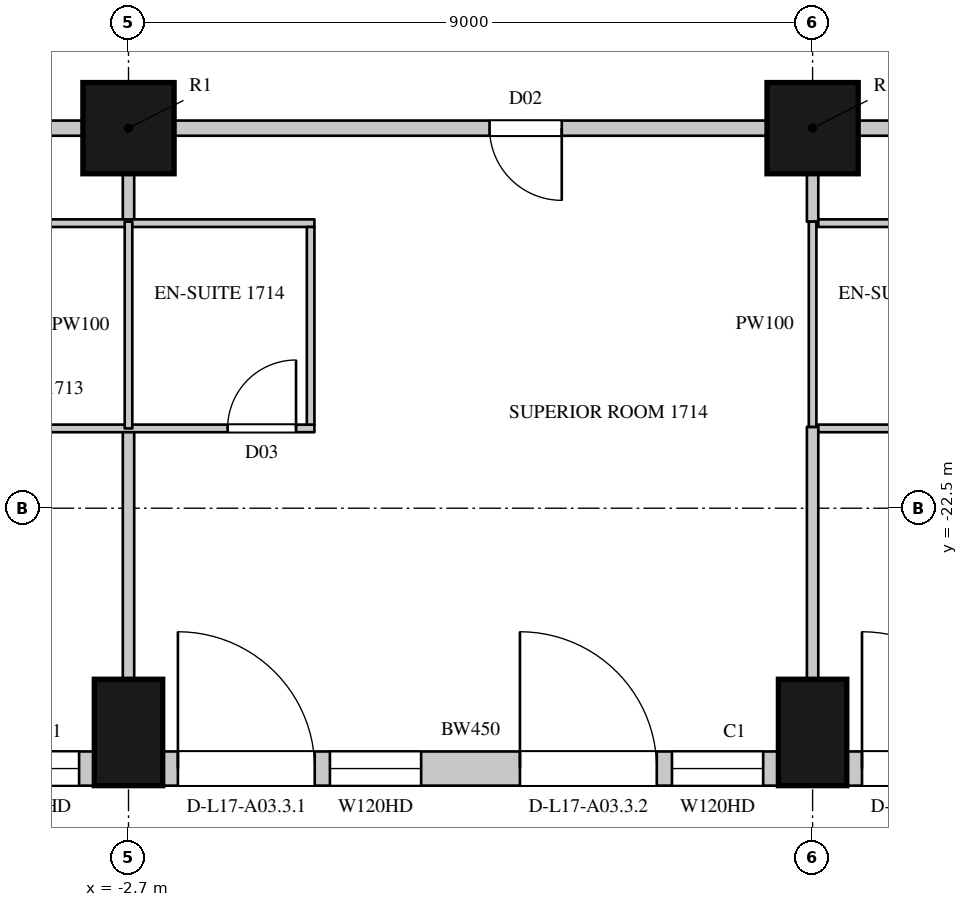
"""IFC4 building model, lengths in metres.
Left out: names, types, materials, properties, quantities, classifications, styles, units other than length and angle.
Written with IfcOpenShell. Run it as: python <this file> out.ifc"""

import sys

from ifc_helpers import new_model, si_unit, direction, frame, frame_2d, origin, origin_2d, place, context, subcontext, project, spatial, rectangle, circle, extrude, element, fill, save


model = new_model("IFC4")
c1 = context("Model", 3, precision=1e-05, world=origin(), true_north=direction((0.0, 1.0)))
c2 = subcontext(c1, "Body", "Model", "MODEL_VIEW")
j1 = project(units=[si_unit("LENGTHUNIT", "METRE"), si_unit("PLANEANGLEUNIT", "RADIAN")], contexts=[c1])
p1 = place(None, origin())
s1 = spatial("IfcSite", under=j1, at=p1, CompositionType="ELEMENT")
p2 = place(p1, origin())
s2 = spatial("IfcBuilding", under=s1, at=p2, CompositionType="ELEMENT")
p3 = place(p2, frame((0.0, 0.0, 91.5)))
s3 = spatial("IfcBuildingStorey", under=s2, at=p3, CompositionType="ELEMENT", Elevation=91.5)
for number, where, z_axis, x_axis in (
    (1, (-2.7, -25.45, 0.0), (0.0, 0.0, 1.0), (1.0, 0.0, 0.0)),
    (2, (6.3, -25.45, 0.0), (0.0, 0.0, 1.0), (1.0, 0.0, 0.0)),
):
    element("IfcColumn", number, at=place(p3, frame(where, z_axis=z_axis, x_axis=x_axis)), inside=s3, PredefinedType="COLUMN", context=c2, shape_type="SweptSolid", body=[
        extrude(rectangle(XDim=0.9, YDim=1.4, at=origin_2d()), origin(), (0.0, 0.0, 1.0), 3.6),
    ])
for number, where, z_axis, x_axis in (
    (3, (-2.7, -17.5, 0.0), (0.0, 0.0, 1.0), (1.0, 0.0, 0.0)),
    (4, (6.3, -17.5, 0.0), (0.0, 0.0, 1.0), (1.0, 0.0, 0.0)),
):
    element("IfcColumn", number, at=place(p3, frame(where, z_axis=z_axis, x_axis=x_axis)), inside=s3, PredefinedType="COLUMN", context=c2, shape_type="SweptSolid", body=[
        extrude(circle(Radius=0.6, at=origin_2d()), origin(), (0.0, 0.0, 1.0), 3.6),
    ])
p4 = place(p3, frame((-11.25, -25.925, 0.0), z_axis=(0.0, 0.0, 1.0), x_axis=(1.0, 0.0, 0.0)))
e5 = element("IfcWall", 5, at=p4, inside=s3, PredefinedType="SOLIDWALL", context=c2, shape_type="SweptSolid", body=[
    extrude(rectangle(XDim=8.1, YDim=0.45, at=frame_2d((4.05, 0.0))), origin(), (0.0, 0.0, 1.0), 3.3),
])
p5 = place(p4, frame((0.2, 0.0, 0.0)))
e6 = element("IfcOpeningElement", 6, at=p5, cuts=e5, PredefinedType="OPENING", context=c2, shape_type="SweptSolid", body=[
    extrude(rectangle(XDim=1.8, YDim=2.4, at=frame_2d((0.9, 1.2))), frame((0.0, 0.235, 0.0), z_axis=(0.0, -1.0, 0.0), x_axis=(1.0, 0.0, 0.0)), (0.0, 0.0, 1.0), 0.47),
])
p6 = place(p4, frame((2.2, 0.0, 1.05)))
e7 = element("IfcOpeningElement", 7, at=p6, cuts=e5, PredefinedType="OPENING", context=c2, shape_type="SweptSolid", body=[
    extrude(rectangle(XDim=1.2, YDim=2.0, at=frame_2d((0.6, 1.0))), frame((0.0, 0.235, 0.0), z_axis=(0.0, -1.0, 0.0), x_axis=(1.0, 0.0, 0.0)), (0.0, 0.0, 1.0), 0.47),
])
p7 = place(p4, frame((4.7, 0.0, 0.0)))
e8 = element("IfcOpeningElement", 8, at=p7, cuts=e5, PredefinedType="OPENING", context=c2, shape_type="SweptSolid", body=[
    extrude(rectangle(XDim=1.8, YDim=2.4, at=frame_2d((0.9, 1.2))), frame((0.0, 0.235, 0.0), z_axis=(0.0, -1.0, 0.0), x_axis=(1.0, 0.0, 0.0)), (0.0, 0.0, 1.0), 0.47),
])
p8 = place(p4, frame((6.7, 0.0, 1.05)))
e9 = element("IfcOpeningElement", 9, at=p8, cuts=e5, PredefinedType="OPENING", context=c2, shape_type="SweptSolid", body=[
    extrude(rectangle(XDim=1.2, YDim=2.0, at=frame_2d((0.6, 1.0))), frame((0.0, 0.235, 0.0), z_axis=(0.0, -1.0, 0.0), x_axis=(1.0, 0.0, 0.0)), (0.0, 0.0, 1.0), 0.47),
])
p9 = place(p3, frame((-2.25, -25.925, 0.0), z_axis=(0.0, 0.0, 1.0), x_axis=(1.0, 0.0, 0.0)))
e10 = element("IfcWall", 10, at=p9, inside=s3, PredefinedType="SOLIDWALL", context=c2, shape_type="SweptSolid", body=[
    extrude(rectangle(XDim=8.1, YDim=0.45, at=frame_2d((4.05, 0.0))), origin(), (0.0, 0.0, 1.0), 3.3),
])
p10 = place(p9, frame((0.2, 0.0, 0.0)))
e11 = element("IfcOpeningElement", 11, at=p10, cuts=e10, PredefinedType="OPENING", context=c2, shape_type="SweptSolid", body=[
    extrude(rectangle(XDim=1.8, YDim=2.4, at=frame_2d((0.9, 1.2))), frame((0.0, 0.235, 0.0), z_axis=(0.0, -1.0, 0.0), x_axis=(1.0, 0.0, 0.0)), (0.0, 0.0, 1.0), 0.47),
])
p11 = place(p9, frame((2.2, 0.0, 1.05)))
e12 = element("IfcOpeningElement", 12, at=p11, cuts=e10, PredefinedType="OPENING", context=c2, shape_type="SweptSolid", body=[
    extrude(rectangle(XDim=1.2, YDim=2.0, at=frame_2d((0.6, 1.0))), frame((0.0, 0.235, 0.0), z_axis=(0.0, -1.0, 0.0), x_axis=(1.0, 0.0, 0.0)), (0.0, 0.0, 1.0), 0.47),
])
p12 = place(p9, frame((4.7, 0.0, 0.0)))
e13 = element("IfcOpeningElement", 13, at=p12, cuts=e10, PredefinedType="OPENING", context=c2, shape_type="SweptSolid", body=[
    extrude(rectangle(XDim=1.8, YDim=2.4, at=frame_2d((0.9, 1.2))), frame((0.0, 0.235, 0.0), z_axis=(0.0, -1.0, 0.0), x_axis=(1.0, 0.0, 0.0)), (0.0, 0.0, 1.0), 0.47),
])
p13 = place(p9, frame((6.7, 0.0, 1.05)))
e14 = element("IfcOpeningElement", 14, at=p13, cuts=e10, PredefinedType="OPENING", context=c2, shape_type="SweptSolid", body=[
    extrude(rectangle(XDim=1.2, YDim=2.0, at=frame_2d((0.6, 1.0))), frame((0.0, 0.235, 0.0), z_axis=(0.0, -1.0, 0.0), x_axis=(1.0, 0.0, 0.0)), (0.0, 0.0, 1.0), 0.47),
])
p14 = place(p3, frame((6.75, -25.925, 0.0), z_axis=(0.0, 0.0, 1.0), x_axis=(1.0, 0.0, 0.0)))
e15 = element("IfcWall", 15, at=p14, inside=s3, PredefinedType="SOLIDWALL", context=c2, shape_type="SweptSolid", body=[
    extrude(rectangle(XDim=8.1, YDim=0.45, at=frame_2d((4.05, 0.0))), origin(), (0.0, 0.0, 1.0), 3.3),
])
p15 = place(p14, frame((0.2, 0.0, 0.0)))
e16 = element("IfcOpeningElement", 16, at=p15, cuts=e15, PredefinedType="OPENING", context=c2, shape_type="SweptSolid", body=[
    extrude(rectangle(XDim=1.8, YDim=2.4, at=frame_2d((0.9, 1.2))), frame((0.0, 0.235, 0.0), z_axis=(0.0, -1.0, 0.0), x_axis=(1.0, 0.0, 0.0)), (0.0, 0.0, 1.0), 0.47),
])
p16 = place(p14, frame((2.2, 0.0, 1.05)))
e17 = element("IfcOpeningElement", 17, at=p16, cuts=e15, PredefinedType="OPENING", context=c2, shape_type="SweptSolid", body=[
    extrude(rectangle(XDim=1.2, YDim=2.0, at=frame_2d((0.6, 1.0))), frame((0.0, 0.235, 0.0), z_axis=(0.0, -1.0, 0.0), x_axis=(1.0, 0.0, 0.0)), (0.0, 0.0, 1.0), 0.47),
])
p17 = place(p14, frame((5.4, 0.0, 0.0)))
e18 = element("IfcOpeningElement", 18, at=p17, cuts=e15, PredefinedType="OPENING", context=c2, shape_type="SweptSolid", body=[
    extrude(rectangle(XDim=1.8, YDim=2.4, at=frame_2d((0.9, 1.2))), frame((0.0, 0.235, 0.0), z_axis=(0.0, -1.0, 0.0), x_axis=(1.0, 0.0, 0.0)), (0.0, 0.0, 1.0), 0.47),
])
p18 = place(p3, frame((-11.1, -17.5, 0.0), z_axis=(0.0, 0.0, 1.0), x_axis=(1.0, 0.0, 0.0)))
e19 = element("IfcWall", 19, at=p18, inside=s3, PredefinedType="PARTITIONING", context=c2, shape_type="SweptSolid", body=[
    extrude(rectangle(XDim=7.8, YDim=0.2, at=frame_2d((3.9, 0.0))), origin(), (0.0, 0.0, 1.0), 2.75),
])
p19 = place(p18, frame((4.2, 0.0, 0.0)))
e20 = element("IfcOpeningElement", 20, at=p19, cuts=e19, PredefinedType="OPENING", context=c2, shape_type="SweptSolid", body=[
    extrude(rectangle(XDim=0.95, YDim=2.2, at=frame_2d((0.475, 1.1))), frame((0.0, 0.11, 0.0), z_axis=(0.0, -1.0, 0.0), x_axis=(1.0, 0.0, 0.0)), (0.0, 0.0, 1.0), 0.22),
])
p20 = place(p3, frame((-2.1, -17.5, 0.0), z_axis=(0.0, 0.0, 1.0), x_axis=(1.0, 0.0, 0.0)))
e21 = element("IfcWall", 21, at=p20, inside=s3, PredefinedType="PARTITIONING", context=c2, shape_type="SweptSolid", body=[
    extrude(rectangle(XDim=7.8, YDim=0.2, at=frame_2d((3.9, 0.0))), origin(), (0.0, 0.0, 1.0), 2.75),
])
p21 = place(p20, frame((4.15, 0.0, 0.0)))
e22 = element("IfcOpeningElement", 22, at=p21, cuts=e21, PredefinedType="OPENING", context=c2, shape_type="SweptSolid", body=[
    extrude(rectangle(XDim=0.95, YDim=2.2, at=frame_2d((0.475, 1.1))), frame((0.0, 0.11, 0.0), z_axis=(0.0, -1.0, 0.0), x_axis=(1.0, 0.0, 0.0)), (0.0, 0.0, 1.0), 0.22),
])
p22 = place(p3, frame((6.9, -17.5, 0.0), z_axis=(0.0, 0.0, 1.0), x_axis=(1.0, 0.0, 0.0)))
e23 = element("IfcWall", 23, at=p22, inside=s3, PredefinedType="PARTITIONING", context=c2, shape_type="SweptSolid", body=[
    extrude(rectangle(XDim=7.8, YDim=0.2, at=frame_2d((3.9, 0.0))), origin(), (0.0, 0.0, 1.0), 2.75),
])
p23 = place(p22, frame((2.4, 0.0, 0.0)))
e24 = element("IfcOpeningElement", 24, at=p23, cuts=e23, PredefinedType="OPENING", context=c2, shape_type="SweptSolid", body=[
    extrude(rectangle(XDim=0.95, YDim=2.2, at=frame_2d((0.475, 1.1))), frame((0.0, 0.11, 0.0), z_axis=(0.0, -1.0, 0.0), x_axis=(1.0, 0.0, 0.0)), (0.0, 0.0, 1.0), 0.22),
])
p24 = place(p22, frame((4.85, 0.0, 0.0)))
e25 = element("IfcOpeningElement", 25, at=p24, cuts=e23, PredefinedType="OPENING", context=c2, shape_type="SweptSolid", body=[
    extrude(rectangle(XDim=0.95, YDim=2.2, at=frame_2d((0.475, 1.1))), frame((0.0, 0.11, 0.0), z_axis=(0.0, -1.0, 0.0), x_axis=(1.0, 0.0, 0.0)), (0.0, 0.0, 1.0), 0.22),
])
p25 = place(p3, frame((-2.7, -24.75, 0.0), z_axis=(0.0, 0.0, 1.0), x_axis=(0.0, 1.0, 0.0)))
e26 = element("IfcWall", 26, at=p25, inside=s3, PredefinedType="PARTITIONING", context=c2, shape_type="SweptSolid", body=[
    extrude(rectangle(XDim=3.3, YDim=0.15, at=frame_2d((1.65, 0.0))), origin(), (0.0, 0.0, 1.0), 2.75),
])
p26 = place(p3, frame((-2.7, -18.73, 0.0), z_axis=(0.0, 0.0, 1.0), x_axis=(0.0, 1.0, 0.0)))
e27 = element("IfcWall", 27, at=p26, inside=s3, PredefinedType="PARTITIONING", context=c2, shape_type="SweptSolid", body=[
    extrude(rectangle(XDim=0.63, YDim=0.15, at=frame_2d((0.315, 0.0))), origin(), (0.0, 0.0, 1.0), 2.75),
])
p27 = place(p3, frame((6.3, -24.75, 0.0), z_axis=(0.0, 0.0, 1.0), x_axis=(0.0, 1.0, 0.0)))
e28 = element("IfcWall", 28, at=p27, inside=s3, PredefinedType="PARTITIONING", context=c2, shape_type="SweptSolid", body=[
    extrude(rectangle(XDim=3.32, YDim=0.15, at=frame_2d((1.66, 0.0))), origin(), (0.0, 0.0, 1.0), 2.75),
])
p28 = place(p3, frame((6.3, -18.73, 0.0), z_axis=(0.0, 0.0, 1.0), x_axis=(0.0, 1.0, 0.0)))
e29 = element("IfcWall", 29, at=p28, inside=s3, PredefinedType="PARTITIONING", context=c2, shape_type="SweptSolid", body=[
    extrude(rectangle(XDim=0.63, YDim=0.15, at=frame_2d((0.315, 0.0))), origin(), (0.0, 0.0, 1.0), 2.75),
])
p29 = place(p3, frame((-5.646, -21.45, 0.0), z_axis=(0.0, 0.0, 1.0), x_axis=(1.0, 0.0, 0.0)))
e30 = element("IfcWall", 30, at=p29, inside=s3, PredefinedType="PARTITIONING", context=c2, shape_type="SweptSolid", body=[
    extrude(rectangle(XDim=5.392, YDim=0.1, at=frame_2d((2.696, 0.0))), origin(), (0.0, 0.0, 1.0), 3.3),
])
p30 = place(p29, frame((4.25, 0.0, 0.0)))
e31 = element("IfcOpeningElement", 31, at=p30, cuts=e30, PredefinedType="OPENING", context=c2, shape_type="SweptSolid", body=[
    extrude(rectangle(XDim=0.9, YDim=2.2, at=frame_2d((0.45, 1.1))), frame((0.0, 0.06, 0.0), z_axis=(0.0, -1.0, 0.0), x_axis=(1.0, 0.0, 0.0)), (0.0, 0.0, 1.0), 0.12),
])
p31 = place(p3, frame((-5.646, -18.75, 0.0), z_axis=(0.0, 0.0, 1.0), x_axis=(1.0, 0.0, 0.0)))
e32 = element("IfcWall", 32, at=p31, inside=s3, PredefinedType="PARTITIONING", context=c2, shape_type="SweptSolid", body=[
    extrude(rectangle(XDim=5.392, YDim=0.1, at=frame_2d((2.696, 0.0))), origin(), (0.0, 0.0, 1.0), 3.3),
])
p32 = place(p3, frame((-2.7, -21.45, 0.0), z_axis=(0.0, 0.0, 1.0), x_axis=(0.0, 1.0, 0.0)))
e33 = element("IfcWall", 33, at=p32, inside=s3, PredefinedType="PARTITIONING", context=c2, shape_type="SweptSolid", body=[
    extrude(rectangle(XDim=2.72, YDim=0.1, at=frame_2d((1.36, 0.0))), origin(), (0.0, 0.0, 1.0), 2.75),
])
p33 = place(p3, frame((-0.304, -21.4, 0.0), z_axis=(0.0, 0.0, 1.0), x_axis=(0.0, 1.0, 0.0)))
e34 = element("IfcWall", 34, at=p33, inside=s3, PredefinedType="PARTITIONING", context=c2, shape_type="SweptSolid", body=[
    extrude(rectangle(XDim=2.6, YDim=0.1, at=frame_2d((1.3, 0.0))), origin(), (0.0, 0.0, 1.0), 3.3),
])
p34 = place(p3, frame((6.3, -21.43, 0.0), z_axis=(0.0, 0.0, 1.0), x_axis=(0.0, 1.0, 0.0)))
e35 = element("IfcWall", 35, at=p34, inside=s3, PredefinedType="PARTITIONING", context=c2, shape_type="SweptSolid", body=[
    extrude(rectangle(XDim=2.7, YDim=0.1, at=frame_2d((1.35, 0.0))), origin(), (0.0, 0.0, 1.0), 2.75),
])
p35 = place(p3, frame((6.375, -21.45, 0.0), z_axis=(0.0, 0.0, 1.0), x_axis=(1.0, 0.0, 0.0)))
e36 = element("IfcWall", 36, at=p35, inside=s3, PredefinedType="PARTITIONING", context=c2, shape_type="SweptSolid", body=[
    extrude(rectangle(XDim=2.371, YDim=0.1, at=frame_2d((1.186, 0.0))), origin(), (0.0, 0.0, 1.0), 3.3),
])
p36 = place(p35, frame((1.25, 0.0, 0.0)))
e37 = element("IfcOpeningElement", 37, at=p36, cuts=e36, PredefinedType="OPENING", context=c2, shape_type="SweptSolid", body=[
    extrude(rectangle(XDim=0.9, YDim=2.2, at=frame_2d((0.45, 1.1))), frame((0.0, 0.06, 0.0), z_axis=(0.0, -1.0, 0.0), x_axis=(1.0, 0.0, 0.0)), (0.0, 0.0, 1.0), 0.12),
])
p37 = place(p3, frame((6.375, -18.75, 0.0), z_axis=(0.0, 0.0, 1.0), x_axis=(1.0, 0.0, 0.0)))
e38 = element("IfcWall", 38, at=p37, inside=s3, PredefinedType="PARTITIONING", context=c2, shape_type="SweptSolid", body=[
    extrude(rectangle(XDim=2.371, YDim=0.1, at=frame_2d((1.186, 0.0))), origin(), (0.0, 0.0, 1.0), 3.3),
])
p38 = place(p8, origin())
e39 = element("IfcWindow", 39, at=p38, inside=s3, PartitioningType="SINGLE_PANEL", PredefinedType="WINDOW", context=c2, shape_type="SweptSolid", body=[
    extrude(rectangle(XDim=1.2, YDim=2.0, at=frame_2d((0.6, 1.0))), frame((0.0, 0.135, 0.0), z_axis=(0.0, -1.0, 0.0), x_axis=(1.0, 0.0, 0.0)), (0.0, 0.0, 1.0), 0.06),
])
fill(e9, e39)
p39 = place(p10, origin())
e40 = element("IfcDoor", 40, at=p39, inside=s3, OperationType="SLIDING_TO_LEFT", PredefinedType="DOOR", context=c2, shape_type="SweptSolid", body=[
    extrude(rectangle(XDim=1.8, YDim=2.4, at=frame_2d((0.9, 1.2))), frame((0.0, 0.13, 0.0), z_axis=(0.0, -1.0, 0.0), x_axis=(1.0, 0.0, 0.0)), (0.0, 0.0, 1.0), 0.05),
])
fill(e11, e40)
p40 = place(p11, origin())
e41 = element("IfcWindow", 41, at=p40, inside=s3, PartitioningType="SINGLE_PANEL", PredefinedType="WINDOW", context=c2, shape_type="SweptSolid", body=[
    extrude(rectangle(XDim=1.2, YDim=2.0, at=frame_2d((0.6, 1.0))), frame((0.0, 0.135, 0.0), z_axis=(0.0, -1.0, 0.0), x_axis=(1.0, 0.0, 0.0)), (0.0, 0.0, 1.0), 0.06),
])
fill(e12, e41)
p41 = place(p12, origin())
e42 = element("IfcDoor", 42, at=p41, inside=s3, OperationType="SLIDING_TO_LEFT", PredefinedType="DOOR", context=c2, shape_type="SweptSolid", body=[
    extrude(rectangle(XDim=1.8, YDim=2.4, at=frame_2d((0.9, 1.2))), frame((0.0, 0.13, 0.0), z_axis=(0.0, -1.0, 0.0), x_axis=(1.0, 0.0, 0.0)), (0.0, 0.0, 1.0), 0.05),
])
fill(e13, e42)
p42 = place(p13, origin())
e43 = element("IfcWindow", 43, at=p42, inside=s3, PartitioningType="SINGLE_PANEL", PredefinedType="WINDOW", context=c2, shape_type="SweptSolid", body=[
    extrude(rectangle(XDim=1.2, YDim=2.0, at=frame_2d((0.6, 1.0))), frame((0.0, 0.135, 0.0), z_axis=(0.0, -1.0, 0.0), x_axis=(1.0, 0.0, 0.0)), (0.0, 0.0, 1.0), 0.06),
])
fill(e14, e43)
p43 = place(p15, origin())
e44 = element("IfcDoor", 44, at=p43, inside=s3, OperationType="SLIDING_TO_LEFT", PredefinedType="DOOR", context=c2, shape_type="SweptSolid", body=[
    extrude(rectangle(XDim=1.8, YDim=2.4, at=frame_2d((0.9, 1.2))), frame((0.0, 0.13, 0.0), z_axis=(0.0, -1.0, 0.0), x_axis=(1.0, 0.0, 0.0)), (0.0, 0.0, 1.0), 0.05),
])
fill(e16, e44)
p44 = place(p21, origin())
e45 = element("IfcDoor", 45, at=p44, inside=s3, OperationType="SINGLE_SWING_LEFT", PredefinedType="DOOR", context=c2, shape_type="SweptSolid", body=[
    extrude(rectangle(XDim=0.95, YDim=2.2, at=frame_2d((0.475, 1.1))), frame((0.0, 0.025, 0.0), z_axis=(0.0, -1.0, 0.0), x_axis=(1.0, 0.0, 0.0)), (0.0, 0.0, 1.0), 0.05),
])
fill(e22, e45)
p45 = place(p30, origin())
e46 = element("IfcDoor", 46, at=p45, inside=s3, OperationType="SINGLE_SWING_RIGHT", PredefinedType="DOOR", context=c2, shape_type="SweptSolid", body=[
    extrude(rectangle(XDim=0.9, YDim=2.2, at=frame_2d((0.45, 1.1))), frame((0.0, 0.025, 0.0), z_axis=(0.0, -1.0, 0.0), x_axis=(1.0, 0.0, 0.0)), (0.0, 0.0, 1.0), 0.05),
])
fill(e31, e46)
save(model, sys.argv[1])
